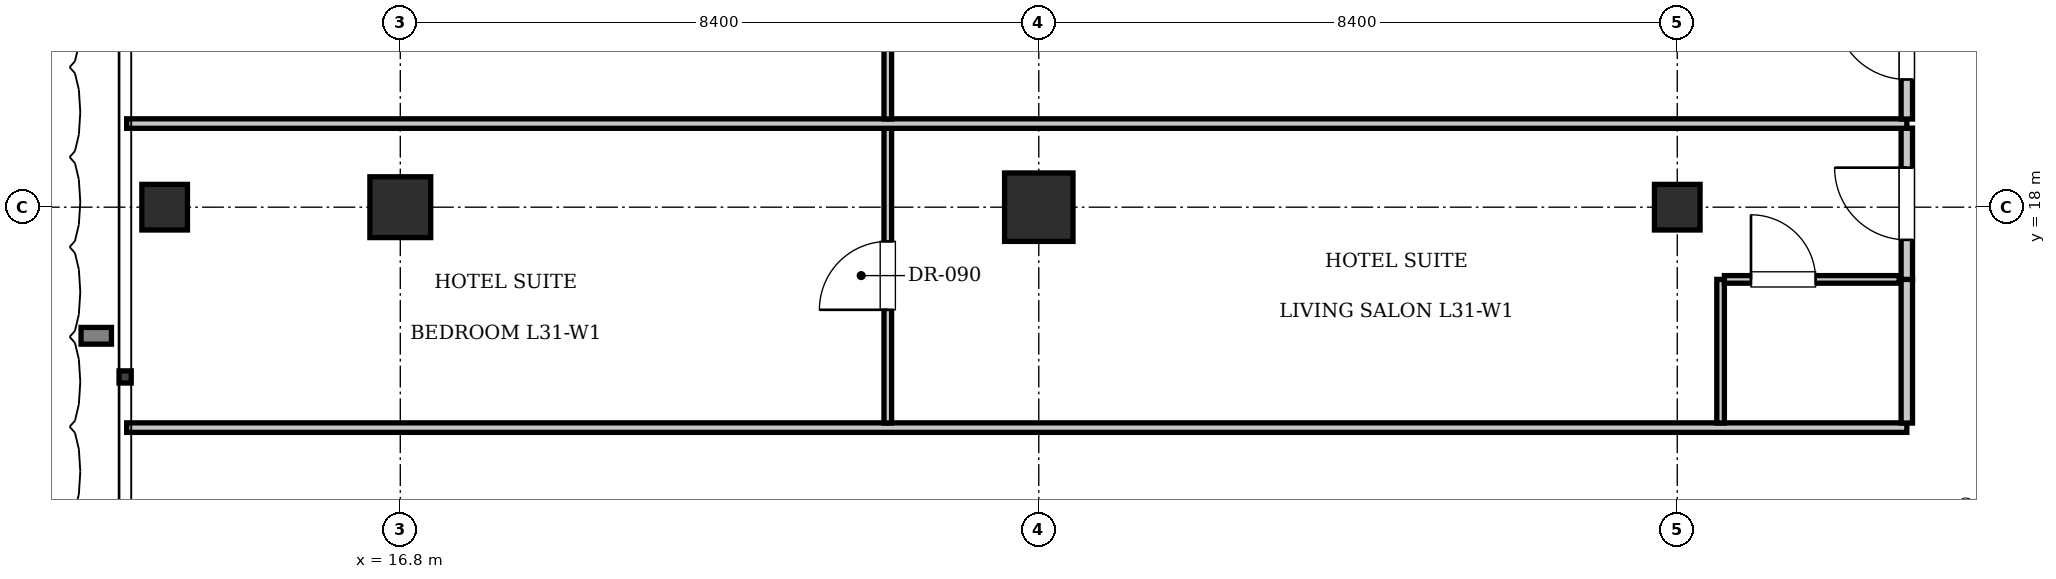
"""IFC4 building model, lengths in metres.
Left out: names, types, materials, properties, quantities, classifications, styles, units other than length and angle.
Written with IfcOpenShell. Run it as: python <this file> out.ifc"""

import sys

from ifc_helpers import new_model, si_unit, direction, frame, frame_2d, origin, origin_2d, place, context, subcontext, project, spatial, rectangle, i_section, extrude, element, fill, save


model = new_model("IFC4")
c1 = context("Model", 3, precision=1e-05, world=origin(), true_north=direction((0.0, 1.0)))
c2 = subcontext(c1, "Body", "Model", "MODEL_VIEW")
j1 = project(units=[si_unit("LENGTHUNIT", "METRE"), si_unit("PLANEANGLEUNIT", "RADIAN")], contexts=[c1])
p1 = place(None, origin())
s1 = spatial("IfcSite", under=j1, at=p1, CompositionType="ELEMENT")
p2 = place(p1, origin())
s2 = spatial("IfcBuilding", under=s1, at=p2, CompositionType="ELEMENT")
p3 = place(p2, frame((0.0, 0.0, 131.25)))
s3 = spatial("IfcBuildingStorey", under=s2, at=p3, CompositionType="ELEMENT", Elevation=131.25)
p4 = place(p3, frame((25.2, 18.0, 0.0), z_axis=(0.0, 0.0, 1.0), x_axis=(1.0, 0.0, 0.0)))
e1 = element("IfcColumn", 1, at=p4, inside=s3, PredefinedType="COLUMN", context=c2, shape_type="SweptSolid", body=[
    extrude(rectangle(XDim=0.9, YDim=0.9, at=origin_2d()), origin(), (0.0, 0.0, 1.0), 3.85),
])
p5 = place(p3, frame((33.6, 18.0, 0.0), z_axis=(0.0, 0.0, 1.0), x_axis=(1.0, 0.0, 0.0)))
e2 = element("IfcColumn", 2, at=p5, inside=s3, PredefinedType="COLUMN", context=c2, shape_type="SweptSolid", body=[
    extrude(i_section(OverallWidth=0.6, OverallDepth=0.6, WebThickness=0.025, FlangeThickness=0.038, at=origin_2d()), origin(), (0.0, 0.0, 1.0), 3.85),
])
p6 = place(p3, frame((16.8, 18.0, 0.0), z_axis=(0.0, 0.0, 1.0), x_axis=(1.0, 0.0, 0.0)))
e3 = element("IfcColumn", 3, at=p6, inside=s3, PredefinedType="COLUMN", context=c2, shape_type="SweptSolid", body=[
    extrude(rectangle(XDim=0.8, YDim=0.8, at=origin_2d()), origin(), (0.0, 0.0, 1.0), 3.85),
])
p7 = place(p3, frame((13.7, 18.0, 0.0), z_axis=(0.0, 0.0, 1.0), x_axis=(1.0, 0.0, 0.0)))
e4 = element("IfcColumn", 4, at=p7, inside=s3, PredefinedType="COLUMN", context=c2, shape_type="SweptSolid", body=[
    extrude(i_section(OverallWidth=0.6, OverallDepth=0.6, WebThickness=0.025, FlangeThickness=0.038, at=origin_2d()), origin(), (0.0, 0.0, 1.0), 3.85),
])
p8 = place(p3, frame((13.2, 15.1, 0.0), z_axis=(0.0, 0.0, 1.0), x_axis=(1.0, 0.0, 0.0)))
e5 = element("IfcWall", 5, at=p8, inside=s3, PredefinedType="PARTITIONING", context=c2, shape_type="SweptSolid", body=[
    extrude(rectangle(XDim=23.42, YDim=0.125, at=frame_2d((11.71, 0.0))), origin(), (0.0, 0.0, 1.0), 3.61),
])
p9 = place(p3, frame((36.62, 15.16, 0.0), z_axis=(0.0, 0.0, 1.0), x_axis=(0.0, 1.0, 0.0)))
e6 = element("IfcWall", 6, at=p9, inside=s3, PredefinedType="PARTITIONING", context=c2, shape_type="SweptSolid", body=[
    extrude(rectangle(XDim=1.89, YDim=0.15, at=frame_2d((0.945, 0.0))), origin(), (0.0, 0.0, 1.0), 3.61),
])
p10 = place(p3, frame((36.62, 17.05, 0.0), z_axis=(0.0, 0.0, 1.0), x_axis=(0.0, 1.0, 0.0)))
e7 = element("IfcWall", 7, at=p10, inside=s3, PredefinedType="PARTITIONING", context=c2, shape_type="SweptSolid", body=[
    extrude(rectangle(XDim=1.99, YDim=0.15, at=frame_2d((0.995, 0.0))), origin(), (0.0, 0.0, 1.0), 3.61),
])
p11 = place(p10, frame((0.52, 0.0, 0.0)))
e8 = element("IfcOpeningElement", 8, at=p11, cuts=e7, PredefinedType="OPENING", context=c2, shape_type="SweptSolid", body=[
    extrude(rectangle(XDim=0.95, YDim=2.15, at=frame_2d((0.475, 1.075))), frame((0.0, 0.085, 0.0), z_axis=(0.0, -1.0, 0.0), x_axis=(1.0, 0.0, 0.0)), (0.0, 0.0, 1.0), 0.17),
])
p12 = place(p3, frame((34.17, 15.16, 0.0), z_axis=(0.0, 0.0, 1.0), x_axis=(0.0, 1.0, 0.0)))
e9 = element("IfcWall", 9, at=p12, inside=s3, PredefinedType="PARTITIONING", context=c2, shape_type="SweptSolid", body=[
    extrude(rectangle(XDim=1.89, YDim=0.1, at=frame_2d((0.945, 0.0))), origin(), (0.0, 0.0, 1.0), 3.61),
])
p13 = place(p3, frame((34.22, 17.05, 0.0), z_axis=(0.0, 0.0, 1.0), x_axis=(1.0, 0.0, 0.0)))
e10 = element("IfcWall", 10, at=p13, inside=s3, PredefinedType="PARTITIONING", context=c2, shape_type="SweptSolid", body=[
    extrude(rectangle(XDim=2.3, YDim=0.1, at=frame_2d((1.15, 0.0))), origin(), (0.0, 0.0, 1.0), 3.61),
])
p14 = place(p13, frame((0.35, 0.0, 0.0)))
e11 = element("IfcOpeningElement", 11, at=p14, cuts=e10, PredefinedType="OPENING", context=c2, shape_type="SweptSolid", body=[
    extrude(rectangle(XDim=0.85, YDim=2.1, at=frame_2d((0.425, 1.05))), frame((0.0, 0.06, 0.0), z_axis=(0.0, -1.0, 0.0), x_axis=(1.0, 0.0, 0.0)), (0.0, 0.0, 1.0), 0.12),
])
p15 = place(p3, frame((23.214, 15.16, 0.0), z_axis=(0.0, 0.0, 1.0), x_axis=(0.0, 1.0, 0.0)))
e12 = element("IfcWall", 12, at=p15, inside=s3, PredefinedType="PARTITIONING", context=c2, shape_type="SweptSolid", body=[
    extrude(rectangle(XDim=3.88, YDim=0.1, at=frame_2d((1.94, 0.0))), origin(), (0.0, 0.0, 1.0), 3.61),
])
p16 = place(p15, frame((1.49, 0.0, 0.0)))
e13 = element("IfcOpeningElement", 13, at=p16, cuts=e12, PredefinedType="OPENING", context=c2, shape_type="SweptSolid", body=[
    extrude(rectangle(XDim=0.9, YDim=2.1, at=frame_2d((0.45, 1.05))), frame((0.0, 0.06, 0.0), z_axis=(0.0, -1.0, 0.0), x_axis=(1.0, 0.0, 0.0)), (0.0, 0.0, 1.0), 0.12),
])
p17 = place(p3, frame((13.2, 19.1, 0.0), z_axis=(0.0, 0.0, 1.0), x_axis=(1.0, 0.0, 0.0)))
e14 = element("IfcWall", 14, at=p17, inside=s3, PredefinedType="PARTITIONING", context=c2, shape_type="SweptSolid", body=[
    extrude(rectangle(XDim=23.42, YDim=0.125, at=frame_2d((11.71, 0.0))), origin(), (0.0, 0.0, 1.0), 3.61),
])
p18 = place(p3, frame((36.62, 19.16, 0.0), z_axis=(0.0, 0.0, 1.0), x_axis=(0.0, 1.0, 0.0)))
e15 = element("IfcWall", 15, at=p18, inside=s3, PredefinedType="PARTITIONING", context=c2, shape_type="SweptSolid", body=[
    extrude(rectangle(XDim=1.99, YDim=0.15, at=frame_2d((0.995, 0.0))), origin(), (0.0, 0.0, 1.0), 3.61),
])
p19 = place(p18, frame((0.52, 0.0, 0.0)))
e16 = element("IfcOpeningElement", 16, at=p19, cuts=e15, PredefinedType="OPENING", context=c2, shape_type="SweptSolid", body=[
    extrude(rectangle(XDim=0.95, YDim=2.15, at=frame_2d((0.475, 1.075))), frame((0.0, 0.085, 0.0), z_axis=(0.0, -1.0, 0.0), x_axis=(1.0, 0.0, 0.0)), (0.0, 0.0, 1.0), 0.17),
])
p20 = place(p3, frame((23.214, 19.16, 0.0), z_axis=(0.0, 0.0, 1.0), x_axis=(0.0, 1.0, 0.0)))
e17 = element("IfcWall", 17, at=p20, inside=s3, PredefinedType="PARTITIONING", context=c2, shape_type="SweptSolid", body=[
    extrude(rectangle(XDim=3.88, YDim=0.1, at=frame_2d((1.94, 0.0))), origin(), (0.0, 0.0, 1.0), 3.61),
])
p21 = place(p20, frame((1.49, 0.0, 0.0)))
e18 = element("IfcOpeningElement", 18, at=p21, cuts=e17, PredefinedType="OPENING", context=c2, shape_type="SweptSolid", body=[
    extrude(rectangle(XDim=0.9, YDim=2.1, at=frame_2d((0.45, 1.05))), frame((0.0, 0.06, 0.0), z_axis=(0.0, -1.0, 0.0), x_axis=(1.0, 0.0, 0.0)), (0.0, 0.0, 1.0), 0.12),
])
p22 = place(p14, origin())
e19 = element("IfcDoor", 19, at=p22, inside=s3, OperationType="SINGLE_SWING_LEFT", PredefinedType="DOOR", context=c2, shape_type="SweptSolid", body=[
    extrude(rectangle(XDim=0.85, YDim=2.1, at=frame_2d((0.425, 1.05))), frame((0.0, 0.025, 0.0), z_axis=(0.0, -1.0, 0.0), x_axis=(1.0, 0.0, 0.0)), (0.0, 0.0, 1.0), 0.05),
])
fill(e11, e19)
p23 = place(p11, origin())
e20 = element("IfcDoor", 20, at=p23, inside=s3, OperationType="SINGLE_SWING_RIGHT", PredefinedType="DOOR", context=c2, shape_type="SweptSolid", body=[
    extrude(rectangle(XDim=0.95, YDim=2.15, at=frame_2d((0.475, 1.075))), frame((0.0, 0.025, 0.0), z_axis=(0.0, -1.0, 0.0), x_axis=(1.0, 0.0, 0.0)), (0.0, 0.0, 1.0), 0.05),
])
fill(e8, e20)
p24 = place(p16, origin())
e21 = element("IfcDoor", 21, at=p24, inside=s3, OperationType="SINGLE_SWING_LEFT", PredefinedType="DOOR", context=c2, shape_type="SweptSolid", body=[
    extrude(rectangle(XDim=0.9, YDim=2.1, at=frame_2d((0.45, 1.05))), frame((0.0, 0.025, 0.0), z_axis=(0.0, -1.0, 0.0), x_axis=(1.0, 0.0, 0.0)), (0.0, 0.0, 1.0), 0.05),
])
fill(e13, e21)
p25 = place(p19, origin())
e22 = element("IfcDoor", 22, at=p25, inside=s3, OperationType="SINGLE_SWING_RIGHT", PredefinedType="DOOR", context=c2, shape_type="SweptSolid", body=[
    extrude(rectangle(XDim=0.95, YDim=2.15, at=frame_2d((0.475, 1.075))), frame((0.0, 0.025, 0.0), z_axis=(0.0, -1.0, 0.0), x_axis=(1.0, 0.0, 0.0)), (0.0, 0.0, 1.0), 0.05),
])
fill(e16, e22)
save(model, sys.argv[1])
